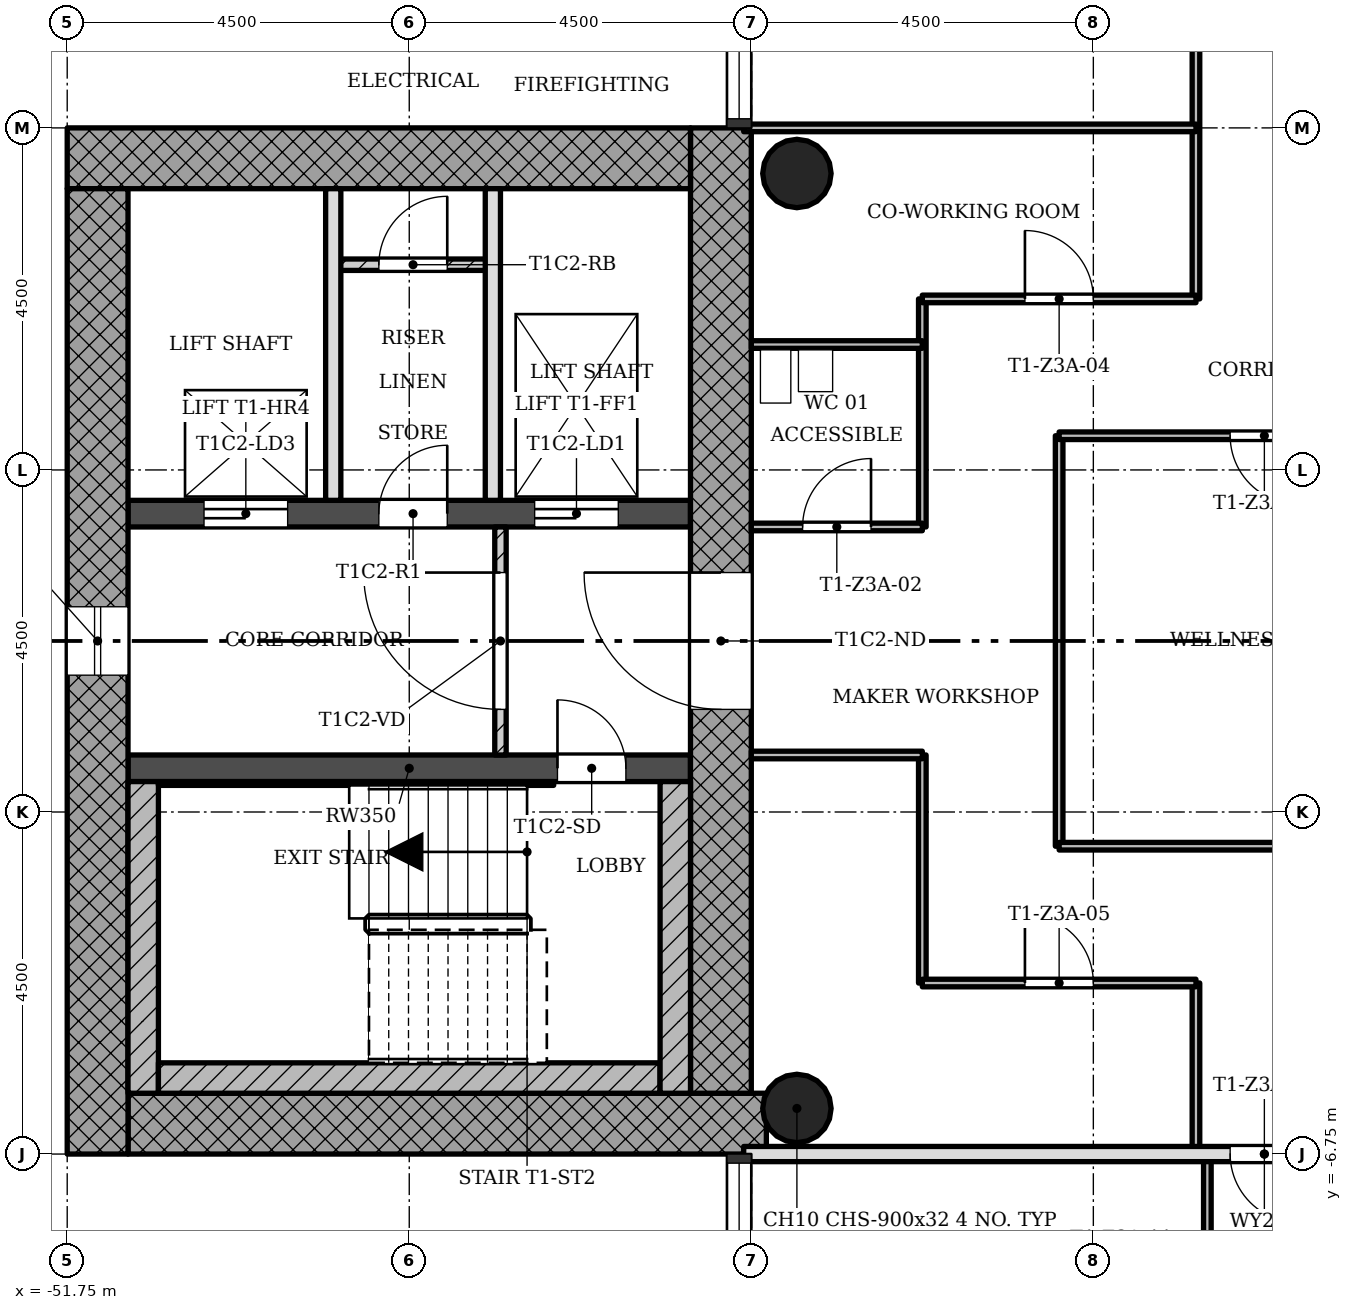
"""IFC4 building model, lengths in metres.
Left out: names, types, materials, properties, quantities, classifications, styles, units other than length and angle.
Written with IfcOpenShell. Run it as: python <this file> out.ifc"""

import sys

from ifc_helpers import new_model, si_unit, direction, frame, frame_2d, origin, origin_2d, place, context, subcontext, project, spatial, rectangle, hollow_circle, extrude, element, fill, save


model = new_model("IFC4")
c1 = context("Model", 3, precision=1e-05, world=origin(), true_north=direction((0.0, 1.0)))
c2 = subcontext(c1, "Body", "Model", "MODEL_VIEW")
j1 = project(units=[si_unit("LENGTHUNIT", "METRE"), si_unit("PLANEANGLEUNIT", "RADIAN")], contexts=[c1])
p1 = place(None, origin())
s1 = spatial("IfcSite", under=j1, at=p1, CompositionType="ELEMENT")
p2 = place(p1, origin())
s2 = spatial("IfcBuilding", under=s1, at=p2, CompositionType="ELEMENT")
p3 = place(p2, frame((0.0, 0.0, 137.1)))
s3 = spatial("IfcBuildingStorey", under=s2, at=p3, CompositionType="ELEMENT", Elevation=137.1)
p4 = place(p3, frame((-50.95, -6.35, 0.0), z_axis=(0.0, 0.0, 1.0), x_axis=(1.0, 0.0, 0.0)))
e1 = element("IfcWall", 1, at=p4, inside=s3, PredefinedType="SHEAR", context=c2, shape_type="SweptSolid", body=[
    extrude(rectangle(XDim=8.398, YDim=0.8, at=frame_2d((4.199, 0.0))), origin(), (0.0, 0.0, 1.0), 3.4),
])
p5 = place(p3, frame((-43.15, -5.95, 0.0), z_axis=(0.0, 0.0, 1.0), x_axis=(0.0, 1.0, 0.0)))
e2 = element("IfcWall", 2, at=p5, inside=s3, PredefinedType="SHEAR", context=c2, shape_type="SweptSolid", body=[
    extrude(rectangle(XDim=12.7, YDim=0.8, at=frame_2d((6.35, 0.0))), origin(), (0.0, 0.0, 1.0), 3.4),
])
p6 = place(p5, frame((5.05, 0.0, 0.0)))
e3 = element("IfcOpeningElement", 3, at=p6, cuts=e2, PredefinedType="OPENING", context=c2, shape_type="SweptSolid", body=[
    extrude(rectangle(XDim=1.8, YDim=2.1, at=frame_2d((0.9, 1.05))), frame((0.0, 0.41, 0.0), z_axis=(0.0, -1.0, 0.0), x_axis=(1.0, 0.0, 0.0)), (0.0, 0.0, 1.0), 0.82),
])
p7 = place(p3, frame((-43.55, 6.35, 0.0), z_axis=(0.0, 0.0, 1.0), x_axis=(-1.0, 0.0, 0.0)))
e4 = element("IfcWall", 4, at=p7, inside=s3, PredefinedType="SHEAR", context=c2, shape_type="SweptSolid", body=[
    extrude(rectangle(XDim=8.2, YDim=0.8, at=frame_2d((4.1, 0.0))), origin(), (0.0, 0.0, 1.0), 3.4),
])
p8 = place(p3, frame((-51.35, 5.95, 0.0), z_axis=(0.0, 0.0, 1.0), x_axis=(0.0, -1.0, 0.0)))
e5 = element("IfcWall", 5, at=p8, inside=s3, PredefinedType="SHEAR", context=c2, shape_type="SweptSolid", body=[
    extrude(rectangle(XDim=12.7, YDim=0.8, at=frame_2d((6.35, 0.0))), origin(), (0.0, 0.0, 1.0), 3.4),
])
p9 = place(p8, frame((5.5, 0.0, 0.45)))
e6 = element("IfcOpeningElement", 6, at=p9, cuts=e5, PredefinedType="OPENING", context=c2, shape_type="SweptSolid", body=[
    extrude(rectangle(XDim=0.9, YDim=2.4, at=frame_2d((0.45, 1.2))), frame((0.0, 0.41, 0.0), z_axis=(0.0, -1.0, 0.0), x_axis=(1.0, 0.0, 0.0)), (0.0, 0.0, 1.0), 0.82),
])
p10 = place(p3, frame((-50.95, -1.675, 0.0), z_axis=(0.0, 0.0, 1.0), x_axis=(1.0, 0.0, 0.0)))
e7 = element("IfcWall", 7, at=p10, inside=s3, PredefinedType="SHEAR", context=c2, shape_type="SweptSolid", body=[
    extrude(rectangle(XDim=7.4, YDim=0.35, at=frame_2d((3.7, 0.0))), origin(), (0.0, 0.0, 1.0), 3.4),
])
p11 = place(p10, frame((5.65, 0.0, 0.0)))
e8 = element("IfcOpeningElement", 8, at=p11, cuts=e7, PredefinedType="OPENING", context=c2, shape_type="SweptSolid", body=[
    extrude(rectangle(XDim=0.9, YDim=2.1, at=frame_2d((0.45, 1.05))), frame((0.0, 0.185, 0.0), z_axis=(0.0, -1.0, 0.0), x_axis=(1.0, 0.0, 0.0)), (0.0, 0.0, 1.0), 0.37),
])
p12 = place(p3, frame((-50.95, 1.675, 0.0), z_axis=(0.0, 0.0, 1.0), x_axis=(1.0, 0.0, 0.0)))
e9 = element("IfcWall", 9, at=p12, inside=s3, PredefinedType="SHEAR", context=c2, shape_type="SweptSolid", body=[
    extrude(rectangle(XDim=7.4, YDim=0.35, at=frame_2d((3.7, 0.0))), origin(), (0.0, 0.0, 1.0), 3.4),
])
p13 = place(p12, frame((5.35, 0.0, 0.0)))
e10 = element("IfcOpeningElement", 10, at=p13, cuts=e9, PredefinedType="OPENING", context=c2, shape_type="SweptSolid", body=[
    extrude(rectangle(XDim=1.1, YDim=2.1, at=frame_2d((0.55, 1.05))), frame((0.0, 0.185, 0.0), z_axis=(0.0, -1.0, 0.0), x_axis=(1.0, 0.0, 0.0)), (0.0, 0.0, 1.0), 0.37),
])
p14 = place(p12, frame((1.0, 0.0, 0.0)))
e11 = element("IfcOpeningElement", 11, at=p14, cuts=e9, PredefinedType="OPENING", context=c2, shape_type="SweptSolid", body=[
    extrude(rectangle(XDim=1.1, YDim=2.1, at=frame_2d((0.55, 1.05))), frame((0.0, 0.185, 0.0), z_axis=(0.0, -1.0, 0.0), x_axis=(1.0, 0.0, 0.0)), (0.0, 0.0, 1.0), 0.37),
])
p15 = place(p12, frame((3.3, 0.0, 0.0)))
e12 = element("IfcOpeningElement", 12, at=p15, cuts=e9, PredefinedType="OPENING", context=c2, shape_type="SweptSolid", body=[
    extrude(rectangle(XDim=0.9, YDim=2.1, at=frame_2d((0.45, 1.05))), frame((0.0, 0.185, 0.0), z_axis=(0.0, -1.0, 0.0), x_axis=(1.0, 0.0, 0.0)), (0.0, 0.0, 1.0), 0.37),
])
for number, where, z_axis, x_axis in (
    (13, (-42.15, -6.15, 0.0), (0.0, 0.0, 1.0), (1.0, 0.0, 0.0)),
    (14, (-42.15, 6.15, 0.0), (0.0, 0.0, 1.0), (1.0, 0.0, 0.0)),
):
    element("IfcColumn", number, at=place(p3, frame(where, z_axis=z_axis, x_axis=x_axis)), inside=s3, PredefinedType="COLUMN", context=c2, shape_type="SweptSolid", body=[
        extrude(hollow_circle(Radius=0.45, WallThickness=0.032, at=origin_2d()), origin(), (0.0, 0.0, 1.0), 3.4),
    ])
p16 = place(p3, frame((-46.05, 1.5, 0.0), z_axis=(0.0, 0.0, 1.0), x_axis=(0.0, -1.0, 0.0)))
e15 = element("IfcWall", 15, at=p16, inside=s3, PredefinedType="PARTITIONING", context=c2, shape_type="SweptSolid", body=[
    extrude(rectangle(XDim=3.0, YDim=0.15, at=frame_2d((1.5, 0.0))), origin(), (0.0, 0.0, 1.0), 3.0),
])
p17 = place(p16, frame((0.6, 0.0, 0.0)))
e16 = element("IfcOpeningElement", 16, at=p17, cuts=e15, PredefinedType="OPENING", context=c2, shape_type="SweptSolid", body=[
    extrude(rectangle(XDim=1.8, YDim=2.1, at=frame_2d((0.9, 1.05))), frame((0.0, 0.085, 0.0), z_axis=(0.0, -1.0, 0.0), x_axis=(1.0, 0.0, 0.0)), (0.0, 0.0, 1.0), 0.17),
])
for number, where, z_axis, x_axis in (
    (17, (-48.25, 5.95, 0.0), (0.0, 0.0, 1.0), (0.0, -1.0, 0.0)),
    (18, (-46.15, 5.95, 0.0), (0.0, 0.0, 1.0), (0.0, -1.0, 0.0)),
):
    element("IfcWall", number, at=place(p3, frame(where, z_axis=z_axis, x_axis=x_axis)), inside=s3, PredefinedType="SOLIDWALL", context=c2, shape_type="SweptSolid", body=[
        extrude(rectangle(XDim=4.1, YDim=0.2, at=frame_2d((2.05, 0.0))), origin(), (0.0, 0.0, 1.0), 3.0),
    ])
p18 = place(p3, frame((-46.15, 4.95, 0.0), z_axis=(0.0, 0.0, 1.0), x_axis=(-1.0, 0.0, 0.0)))
e19 = element("IfcWall", 19, at=p18, inside=s3, PredefinedType="PARTITIONING", context=c2, shape_type="SweptSolid", body=[
    extrude(rectangle(XDim=2.1, YDim=0.15, at=frame_2d((1.05, 0.0))), origin(), (0.0, 0.0, 1.0), 3.0),
])
p19 = place(p18, frame((0.6, 0.0, 0.0)))
e20 = element("IfcOpeningElement", 20, at=p19, cuts=e19, PredefinedType="OPENING", context=c2, shape_type="SweptSolid", body=[
    extrude(rectangle(XDim=0.9, YDim=2.1, at=frame_2d((0.45, 1.05))), frame((0.0, 0.085, 0.0), z_axis=(0.0, -1.0, 0.0), x_axis=(1.0, 0.0, 0.0)), (0.0, 0.0, 1.0), 0.17),
])
for number, where, z_axis, x_axis in (
    (21, (-40.5, -4.5, 0.0), (0.0, 0.0, 1.0), (0.0, 1.0, 0.0)),
    (22, (-40.5, 1.5, 0.0), (0.0, 0.0, 1.0), (0.0, 1.0, 0.0)),
):
    element("IfcWall", number, at=place(p3, frame(where, z_axis=z_axis, x_axis=x_axis)), inside=s3, PredefinedType="PARTITIONING", context=c2, shape_type="SweptSolid", body=[
        extrude(rectangle(XDim=3.0, YDim=0.1, at=frame_2d((1.5, 0.0))), origin(), (0.0, 0.0, 1.0), 3.0),
    ])
p20 = place(p3, frame((-38.7, -2.7, 0.0), z_axis=(0.0, 0.0, 1.0), x_axis=(0.0, 1.0, 0.0)))
e23 = element("IfcWall", 23, at=p20, inside=s3, PredefinedType="PARTITIONING", context=c2, shape_type="SweptSolid", body=[
    extrude(rectangle(XDim=5.4, YDim=0.1, at=frame_2d((2.7, 0.0))), origin(), (0.0, 0.0, 1.0), 3.0),
])
p21 = place(p3, frame((-36.9, -6.75, 0.0), z_axis=(0.0, 0.0, 1.0), x_axis=(0.0, 1.0, 0.0)))
e24 = element("IfcWall", 24, at=p21, inside=s3, PredefinedType="PARTITIONING", context=c2, shape_type="SweptSolid", body=[
    extrude(rectangle(XDim=2.25, YDim=0.1, at=frame_2d((1.125, 0.0))), origin(), (0.0, 0.0, 1.0), 3.0),
])
p22 = place(p3, frame((-36.9, 4.5, 0.0), z_axis=(0.0, 0.0, 1.0), x_axis=(0.0, 1.0, 0.0)))
e25 = element("IfcWall", 25, at=p22, inside=s3, PredefinedType="PARTITIONING", context=c2, shape_type="SweptSolid", body=[
    extrude(rectangle(XDim=6.75, YDim=0.1, at=frame_2d((3.375, 0.0))), origin(), (0.0, 0.0, 1.0), 3.0),
])
p23 = place(p22, frame((4.05, 0.0, 0.0)))
e26 = element("IfcOpeningElement", 26, at=p23, cuts=e25, PredefinedType="OPENING", context=c2, shape_type="SweptSolid", body=[
    extrude(rectangle(XDim=0.9, YDim=2.1, at=frame_2d((0.45, 1.05))), frame((0.0, 0.06, 0.0), z_axis=(0.0, -1.0, 0.0), x_axis=(1.0, 0.0, 0.0)), (0.0, 0.0, 1.0), 0.12),
])
p24 = place(p3, frame((-36.75, -11.25, 0.0), z_axis=(0.0, 0.0, 1.0), x_axis=(0.0, 1.0, 0.0)))
e27 = element("IfcWall", 27, at=p24, inside=s3, PredefinedType="PARTITIONING", context=c2, shape_type="SweptSolid", body=[
    extrude(rectangle(XDim=4.5, YDim=0.1, at=frame_2d((2.25, 0.0))), origin(), (0.0, 0.0, 1.0), 3.0),
])
p25 = place(p24, frame((1.8, 0.0, 0.0)))
e28 = element("IfcOpeningElement", 28, at=p25, cuts=e27, PredefinedType="OPENING", context=c2, shape_type="SweptSolid", body=[
    extrude(rectangle(XDim=0.9, YDim=2.1, at=frame_2d((0.45, 1.05))), frame((0.0, 0.06, 0.0), z_axis=(0.0, -1.0, 0.0), x_axis=(1.0, 0.0, 0.0)), (0.0, 0.0, 1.0), 0.12),
])
p26 = place(p3, frame((-42.85, -6.75, 0.0), z_axis=(0.0, 0.0, 1.0), x_axis=(1.0, 0.0, 0.0)))
e29 = element("IfcWall", 29, at=p26, inside=s3, PredefinedType="SOLIDWALL", context=c2, shape_type="SweptSolid", body=[
    extrude(rectangle(XDim=13.7, YDim=0.2, at=frame_2d((6.85, 0.0))), origin(), (0.0, 0.0, 1.0), 3.0),
])
p27 = place(p26, frame((6.4, 0.0, 0.0)))
e30 = element("IfcOpeningElement", 30, at=p27, cuts=e29, PredefinedType="OPENING", context=c2, shape_type="SweptSolid", body=[
    extrude(rectangle(XDim=0.9, YDim=2.1, at=frame_2d((0.45, 1.05))), frame((0.0, 0.11, 0.0), z_axis=(0.0, -1.0, 0.0), x_axis=(1.0, 0.0, 0.0)), (0.0, 0.0, 1.0), 0.22),
])
p28 = place(p3, frame((-40.5, -4.5, 0.0), z_axis=(0.0, 0.0, 1.0), x_axis=(1.0, 0.0, 0.0)))
e31 = element("IfcWall", 31, at=p28, inside=s3, PredefinedType="PARTITIONING", context=c2, shape_type="SweptSolid", body=[
    extrude(rectangle(XDim=3.6, YDim=0.1, at=frame_2d((1.8, 0.0))), origin(), (0.0, 0.0, 1.0), 3.0),
])
p29 = place(p28, frame((1.35, 0.0, 0.0)))
e32 = element("IfcOpeningElement", 32, at=p29, cuts=e31, PredefinedType="OPENING", context=c2, shape_type="SweptSolid", body=[
    extrude(rectangle(XDim=0.9, YDim=2.1, at=frame_2d((0.45, 1.05))), frame((0.0, 0.06, 0.0), z_axis=(0.0, -1.0, 0.0), x_axis=(1.0, 0.0, 0.0)), (0.0, 0.0, 1.0), 0.12),
])
p30 = place(p3, frame((-38.7, -2.7, 0.0), z_axis=(0.0, 0.0, 1.0), x_axis=(1.0, 0.0, 0.0)))
e33 = element("IfcWall", 33, at=p30, inside=s3, PredefinedType="PARTITIONING", context=c2, shape_type="SweptSolid", body=[
    extrude(rectangle(XDim=5.4, YDim=0.1, at=frame_2d((2.7, 0.0))), origin(), (0.0, 0.0, 1.0), 3.0),
])
p31 = place(p3, frame((-42.75, -1.5, 0.0), z_axis=(0.0, 0.0, 1.0), x_axis=(1.0, 0.0, 0.0)))
e34 = element("IfcWall", 34, at=p31, inside=s3, PredefinedType="PARTITIONING", context=c2, shape_type="SweptSolid", body=[
    extrude(rectangle(XDim=2.25, YDim=0.1, at=frame_2d((1.125, 0.0))), origin(), (0.0, 0.0, 1.0), 3.0),
])
p32 = place(p3, frame((-42.75, 1.5, 0.0), z_axis=(0.0, 0.0, 1.0), x_axis=(1.0, 0.0, 0.0)))
e35 = element("IfcWall", 35, at=p32, inside=s3, PredefinedType="PARTITIONING", context=c2, shape_type="SweptSolid", body=[
    extrude(rectangle(XDim=2.25, YDim=0.1, at=frame_2d((1.125, 0.0))), origin(), (0.0, 0.0, 1.0), 3.0),
])
p33 = place(p32, frame((0.675, 0.0, 0.0)))
e36 = element("IfcOpeningElement", 36, at=p33, cuts=e35, PredefinedType="OPENING", context=c2, shape_type="SweptSolid", body=[
    extrude(rectangle(XDim=0.9, YDim=2.1, at=frame_2d((0.45, 1.05))), frame((0.0, 0.06, 0.0), z_axis=(0.0, -1.0, 0.0), x_axis=(1.0, 0.0, 0.0)), (0.0, 0.0, 1.0), 0.12),
])
p34 = place(p3, frame((-38.7, 2.7, 0.0), z_axis=(0.0, 0.0, 1.0), x_axis=(1.0, 0.0, 0.0)))
e37 = element("IfcWall", 37, at=p34, inside=s3, PredefinedType="PARTITIONING", context=c2, shape_type="SweptSolid", body=[
    extrude(rectangle(XDim=5.4, YDim=0.1, at=frame_2d((2.7, 0.0))), origin(), (0.0, 0.0, 1.0), 3.0),
])
p35 = place(p34, frame((2.25, 0.0, 0.0)))
e38 = element("IfcOpeningElement", 38, at=p35, cuts=e37, PredefinedType="OPENING", context=c2, shape_type="SweptSolid", body=[
    extrude(rectangle(XDim=0.9, YDim=2.1, at=frame_2d((0.45, 1.05))), frame((0.0, 0.06, 0.0), z_axis=(0.0, -1.0, 0.0), x_axis=(1.0, 0.0, 0.0)), (0.0, 0.0, 1.0), 0.12),
])
p36 = place(p3, frame((-42.75, 3.9, 0.0), z_axis=(0.0, 0.0, 1.0), x_axis=(1.0, 0.0, 0.0)))
e39 = element("IfcWall", 39, at=p36, inside=s3, PredefinedType="PARTITIONING", context=c2, shape_type="SweptSolid", body=[
    extrude(rectangle(XDim=2.25, YDim=0.1, at=frame_2d((1.125, 0.0))), origin(), (0.0, 0.0, 1.0), 3.0),
])
p37 = place(p3, frame((-40.5, 4.5, 0.0), z_axis=(0.0, 0.0, 1.0), x_axis=(1.0, 0.0, 0.0)))
e40 = element("IfcWall", 40, at=p37, inside=s3, PredefinedType="PARTITIONING", context=c2, shape_type="SweptSolid", body=[
    extrude(rectangle(XDim=3.6, YDim=0.1, at=frame_2d((1.8, 0.0))), origin(), (0.0, 0.0, 1.0), 3.0),
])
p38 = place(p37, frame((1.35, 0.0, 0.0)))
e41 = element("IfcOpeningElement", 41, at=p38, cuts=e40, PredefinedType="OPENING", context=c2, shape_type="SweptSolid", body=[
    extrude(rectangle(XDim=0.9, YDim=2.1, at=frame_2d((0.45, 1.05))), frame((0.0, 0.06, 0.0), z_axis=(0.0, -1.0, 0.0), x_axis=(1.0, 0.0, 0.0)), (0.0, 0.0, 1.0), 0.12),
])
p39 = place(p3, frame((-42.85, 6.75, 0.0), z_axis=(0.0, 0.0, 1.0), x_axis=(1.0, 0.0, 0.0)))
e42 = element("IfcWall", 42, at=p39, inside=s3, PredefinedType="PARTITIONING", context=c2, shape_type="SweptSolid", body=[
    extrude(rectangle(XDim=5.95, YDim=0.1, at=frame_2d((2.975, 0.0))), origin(), (0.0, 0.0, 1.0), 3.0),
])
p40 = place(p3, frame((-50.75, -1.85, 0.0), z_axis=(0.0, 0.0, 1.0), x_axis=(0.0, -1.0, 0.0)))
e43 = element("IfcWall", 43, at=p40, inside=s3, PredefinedType="SHEAR", context=c2, shape_type="SweptSolid", body=[
    extrude(rectangle(XDim=4.1, YDim=0.4, at=frame_2d((2.05, 0.0))), origin(), (0.0, 0.0, 1.0), 3.4),
])
p41 = place(p3, frame((-43.95, -5.75, 0.0), z_axis=(0.0, 0.0, 1.0), x_axis=(-1.0, 0.0, 0.0)))
e44 = element("IfcWall", 44, at=p41, inside=s3, PredefinedType="SHEAR", context=c2, shape_type="SweptSolid", body=[
    extrude(rectangle(XDim=6.6, YDim=0.4, at=frame_2d((3.3, 0.0))), origin(), (0.0, 0.0, 1.0), 3.4),
])
p42 = place(p3, frame((-43.75, -1.85, 0.0), z_axis=(0.0, 0.0, 1.0), x_axis=(0.0, -1.0, 0.0)))
e45 = element("IfcWall", 45, at=p42, inside=s3, PredefinedType="SHEAR", context=c2, shape_type="SweptSolid", body=[
    extrude(rectangle(XDim=4.1, YDim=0.4, at=frame_2d((2.05, 0.0))), origin(), (0.0, 0.0, 1.0), 3.4),
])
p43 = place(p3, frame((-45.35, -1.875, 0.0), z_axis=(0.0, 0.0, 1.0), x_axis=(-1.0, 0.0, 0.0)))
e46 = element("IfcWall", 46, at=p43, inside=s3, PredefinedType="SHEAR", context=c2, shape_type="SweptSolid", body=[
    extrude(rectangle(XDim=5.2, YDim=0.05, at=frame_2d((2.6, 0.0))), origin(), (0.0, 0.0, 1.0), 3.4),
])
p44 = place(p9, origin())
e47 = element("IfcWindow", 47, at=p44, inside=s3, PartitioningType="SINGLE_PANEL", PredefinedType="WINDOW", context=c2, shape_type="SweptSolid", body=[
    extrude(rectangle(XDim=0.9, YDim=2.4, at=frame_2d((0.45, 1.2))), frame((0.0, 0.03, 0.0), z_axis=(0.0, -1.0, 0.0), x_axis=(1.0, 0.0, 0.0)), (0.0, 0.0, 1.0), 0.06),
])
fill(e6, e47)
p45 = place(p17, origin())
e48 = element("IfcDoor", 48, at=p45, inside=s3, OperationType="SINGLE_SWING_LEFT", PredefinedType="DOOR", context=c2, shape_type="SweptSolid", body=[
    extrude(rectangle(XDim=1.8, YDim=2.1, at=frame_2d((0.9, 1.05))), frame((0.0, 0.025, 0.0), z_axis=(0.0, -1.0, 0.0), x_axis=(1.0, 0.0, 0.0)), (0.0, 0.0, 1.0), 0.05),
])
fill(e16, e48)
p46 = place(p19, origin())
e49 = element("IfcDoor", 49, at=p46, inside=s3, OperationType="SINGLE_SWING_LEFT", PredefinedType="DOOR", context=c2, shape_type="SweptSolid", body=[
    extrude(rectangle(XDim=0.9, YDim=2.1, at=frame_2d((0.45, 1.05))), frame((0.0, 0.025, 0.0), z_axis=(0.0, -1.0, 0.0), x_axis=(1.0, 0.0, 0.0)), (0.0, 0.0, 1.0), 0.05),
])
fill(e20, e49)
p47 = place(p35, origin())
e50 = element("IfcDoor", 50, at=p47, inside=s3, OperationType="SINGLE_SWING_RIGHT", PredefinedType="DOOR", context=c2, shape_type="SweptSolid", body=[
    extrude(rectangle(XDim=0.9, YDim=2.1, at=frame_2d((0.45, 1.05))), frame((0.0, 0.025, 0.0), z_axis=(0.0, -1.0, 0.0), x_axis=(1.0, 0.0, 0.0)), (0.0, 0.0, 1.0), 0.05),
])
fill(e38, e50)
p48 = place(p33, origin())
e51 = element("IfcDoor", 51, at=p48, inside=s3, OperationType="SINGLE_SWING_LEFT", PredefinedType="DOOR", context=c2, shape_type="SweptSolid", body=[
    extrude(rectangle(XDim=0.9, YDim=2.1, at=frame_2d((0.45, 1.05))), frame((0.0, 0.025, 0.0), z_axis=(0.0, -1.0, 0.0), x_axis=(1.0, 0.0, 0.0)), (0.0, 0.0, 1.0), 0.05),
])
fill(e36, e51)
p49 = place(p38, origin())
e52 = element("IfcDoor", 52, at=p49, inside=s3, OperationType="SINGLE_SWING_RIGHT", PredefinedType="DOOR", context=c2, shape_type="SweptSolid", body=[
    extrude(rectangle(XDim=0.9, YDim=2.1, at=frame_2d((0.45, 1.05))), frame((0.0, 0.025, 0.0), z_axis=(0.0, -1.0, 0.0), x_axis=(1.0, 0.0, 0.0)), (0.0, 0.0, 1.0), 0.05),
])
fill(e41, e52)
p50 = place(p29, origin())
e53 = element("IfcDoor", 53, at=p50, inside=s3, OperationType="SINGLE_SWING_RIGHT", PredefinedType="DOOR", context=c2, shape_type="SweptSolid", body=[
    extrude(rectangle(XDim=0.9, YDim=2.1, at=frame_2d((0.45, 1.05))), frame((0.0, 0.025, 0.0), z_axis=(0.0, -1.0, 0.0), x_axis=(1.0, 0.0, 0.0)), (0.0, 0.0, 1.0), 0.05),
])
fill(e32, e53)
p51 = place(p27, origin())
e54 = element("IfcDoor", 54, at=p51, inside=s3, OperationType="SINGLE_SWING_RIGHT", PredefinedType="DOOR", context=c2, shape_type="SweptSolid", body=[
    extrude(rectangle(XDim=0.9, YDim=2.1, at=frame_2d((0.45, 1.05))), frame((0.0, 0.025, 0.0), z_axis=(0.0, -1.0, 0.0), x_axis=(1.0, 0.0, 0.0)), (0.0, 0.0, 1.0), 0.05),
])
fill(e30, e54)
p52 = place(p11, origin())
e55 = element("IfcDoor", 55, at=p52, inside=s3, OperationType="SINGLE_SWING_RIGHT", PredefinedType="DOOR", context=c2, shape_type="SweptSolid", body=[
    extrude(rectangle(XDim=0.9, YDim=2.1, at=frame_2d((0.45, 1.05))), frame((0.0, 0.025, 0.0), z_axis=(0.0, -1.0, 0.0), x_axis=(1.0, 0.0, 0.0)), (0.0, 0.0, 1.0), 0.05),
])
fill(e8, e55)
p53 = place(p13, origin())
e56 = element("IfcDoor", 56, at=p53, inside=s3, OperationType="SLIDING_TO_LEFT", PredefinedType="DOOR", context=c2, shape_type="SweptSolid", body=[
    extrude(rectangle(XDim=1.1, YDim=2.1, at=frame_2d((0.55, 1.05))), frame((0.0, 0.025, 0.0), z_axis=(0.0, -1.0, 0.0), x_axis=(1.0, 0.0, 0.0)), (0.0, 0.0, 1.0), 0.05),
])
fill(e10, e56)
p54 = place(p14, origin())
e57 = element("IfcDoor", 57, at=p54, inside=s3, OperationType="SLIDING_TO_LEFT", PredefinedType="DOOR", context=c2, shape_type="SweptSolid", body=[
    extrude(rectangle(XDim=1.1, YDim=2.1, at=frame_2d((0.55, 1.05))), frame((0.0, 0.025, 0.0), z_axis=(0.0, -1.0, 0.0), x_axis=(1.0, 0.0, 0.0)), (0.0, 0.0, 1.0), 0.05),
])
fill(e11, e57)
p55 = place(p15, origin())
e58 = element("IfcDoor", 58, at=p55, inside=s3, OperationType="SINGLE_SWING_LEFT", PredefinedType="DOOR", context=c2, shape_type="SweptSolid", body=[
    extrude(rectangle(XDim=0.9, YDim=2.1, at=frame_2d((0.45, 1.05))), frame((0.0, 0.025, 0.0), z_axis=(0.0, -1.0, 0.0), x_axis=(1.0, 0.0, 0.0)), (0.0, 0.0, 1.0), 0.05),
])
fill(e12, e58)
p56 = place(p6, origin())
e59 = element("IfcDoor", 59, at=p56, inside=s3, OperationType="SINGLE_SWING_LEFT", PredefinedType="DOOR", context=c2, shape_type="SweptSolid", body=[
    extrude(rectangle(XDim=1.8, YDim=2.1, at=frame_2d((0.9, 1.05))), frame((0.0, 0.025, 0.0), z_axis=(0.0, -1.0, 0.0), x_axis=(1.0, 0.0, 0.0)), (0.0, 0.0, 1.0), 0.05),
])
fill(e3, e59)
save(model, sys.argv[1])
